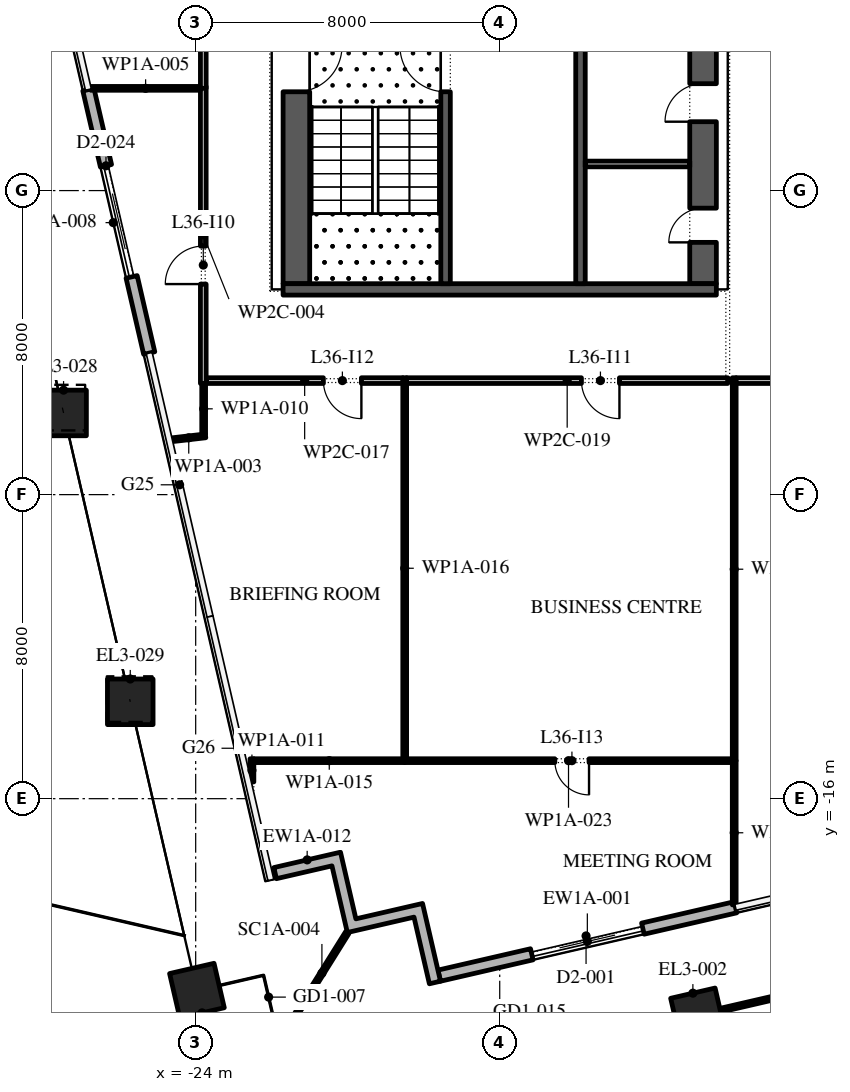
"""IFC4 building model, lengths in metres.
Left out: names, types, materials, properties, quantities, classifications, styles, units other than length and angle.
Written with IfcOpenShell. Run it as: python <this file> out.ifc"""

import sys

from ifc_helpers import new_model, si_unit, direction, frame, frame_2d, origin, origin_2d, place, context, subcontext, project, spatial, polyline, rectangle, outline, extrude, element, fill, save


model = new_model("IFC4")
c1 = context("Model", 3, precision=1e-05, world=origin(), true_north=direction((0.0, 1.0)))
c2 = subcontext(c1, "Body", "Model", "MODEL_VIEW")
j1 = project(units=[si_unit("LENGTHUNIT", "METRE"), si_unit("PLANEANGLEUNIT", "RADIAN")], contexts=[c1])
p1 = place(None, origin())
s1 = spatial("IfcSite", under=j1, at=p1, CompositionType="ELEMENT")
p2 = place(p1, origin())
s2 = spatial("IfcBuilding", under=s1, at=p2, CompositionType="ELEMENT")
p3 = place(p2, frame((0.0, 0.0, 165.6)))
s3 = spatial("IfcBuildingStorey", under=s2, at=p3, CompositionType="ELEMENT", Elevation=165.6)
p4 = place(p3, frame((-10.782, -21.702, 0.0), z_axis=(0.0, 0.0, 1.0), x_axis=(0.974370064785, 0.224951054344, 0.0)))
e1 = element("IfcColumn", 1, at=p4, inside=s3, PredefinedType="COLUMN", context=c2, shape_type="SweptSolid", body=[
    extrude(rectangle(XDim=1.2, YDim=1.2, at=origin_2d()), origin(), (0.0, 0.0, 1.0), 6.0),
])
p5 = place(p3, frame((-27.476, -5.851, 0.0), z_axis=(-0.005410224046, 0.023390066364, 0.999711775599), x_axis=(-0.974276841123, -0.225354469338, 0.0)))
e2 = element("IfcColumn", 2, at=p5, inside=s3, PredefinedType="COLUMN", context=c2, shape_type="SweptSolid", body=[
    extrude(rectangle(XDim=1.2, YDim=1.2, at=origin_2d()), origin(), (0.0, 0.0, 1.0), 6.002),
])
p6 = place(p3, frame((-25.721, -13.451, 0.0), z_axis=(-0.002726040971, 0.011677220279, 0.999928103029), x_axis=(-0.97381617579, -0.227336877275, 0.0)))
e3 = element("IfcColumn", 3, at=p6, inside=s3, PredefinedType="COLUMN", context=c2, shape_type="SweptSolid", body=[
    extrude(rectangle(XDim=1.2, YDim=1.2, at=origin_2d()), origin(), (0.0, 0.0, 1.0), 6.0),
])
p7 = place(p3, frame((-23.967, -21.051, 0.0), z_axis=(0.0, 0.0, 1.0), x_axis=(0.974370064785, 0.224951054344, 0.0)))
e4 = element("IfcColumn", 4, at=p7, inside=s3, PredefinedType="COLUMN", context=c2, shape_type="SweptSolid", body=[
    extrude(rectangle(XDim=1.2, YDim=1.2, at=origin_2d()), origin(), (0.0, 0.0, 1.0), 6.0),
])
p8 = place(p3, frame((-17.592, -20.657, 0.0), z_axis=(0.0, 0.0, 1.0), x_axis=(0.974371132389, 0.224946429994, 0.0)))
e5 = element("IfcWall", 5, at=p8, inside=s3, PredefinedType="STANDARD", context=c2, shape_type="SweptSolid", body=[
    extrude(rectangle(XDim=8.0, YDim=0.3, at=frame_2d((4.0, 0.0))), origin(), (0.0, 0.0, 1.0), 5.8),
])
p9 = place(p8, frame((2.5, 0.0, 0.0)))
e6 = element("IfcOpeningElement", 6, at=p9, cuts=e5, PredefinedType="OPENING", context=c2, shape_type="SweptSolid", body=[
    extrude(rectangle(XDim=3.0, YDim=3.5, at=frame_2d((1.5, 1.75))), frame((0.0, 0.16, 0.0), z_axis=(0.0, -1.0, 0.0), x_axis=(1.0, 0.0, 0.0)), (0.0, 0.0, 1.0), 0.32),
])
p10 = place(p3, frame((-26.823, 2.657, 0.0), z_axis=(0.0, 0.0, 1.0), x_axis=(0.22494221161, -0.974372106249, 0.0)))
e7 = element("IfcWall", 7, at=p10, inside=s3, PredefinedType="STANDARD", context=c2, shape_type="SweptSolid", body=[
    extrude(rectangle(XDim=7.115, YDim=0.3, at=frame_2d((3.557, 0.0))), origin(), (0.0, 0.0, 1.0), 5.8),
])
p11 = place(p10, frame((2.057, 0.0, 0.0)))
e8 = element("IfcOpeningElement", 8, at=p11, cuts=e7, PredefinedType="OPENING", context=c2, shape_type="SweptSolid", body=[
    extrude(rectangle(XDim=3.0, YDim=3.5, at=frame_2d((1.5, 1.75))), frame((0.0, 0.16, 0.0), z_axis=(0.0, -1.0, 0.0), x_axis=(1.0, 0.0, 0.0)), (0.0, 0.0, 1.0), 0.32),
])
p12 = place(p3, origin())
e9 = element("IfcWall", 9, at=p12, inside=s3, PredefinedType="STANDARD", context=c2, shape_type="SweptSolid", body=[
    extrude(outline(polyline([(-18.256, -19.117), (-20.01, -19.522), (-20.414, -17.768), (-21.876, -18.105), (-21.943, -17.813), (-20.19, -17.408), (-19.785, -19.162), (-18.031, -18.757), (-17.558, -20.803), (-17.851, -20.871), (-18.256, -19.117)])), origin(), (0.0, 0.0, 1.0), 5.8),
])
p13 = place(p3, frame((-20.01, -19.522, 0.0), z_axis=(0.0, 0.0, 1.0), x_axis=(-0.529920736377, -0.848047176257, 0.0)))
e10 = element("IfcWall", 10, at=p13, inside=s3, PredefinedType="STANDARD", context=c2, shape_type="SweptSolid", body=[
    extrude(rectangle(XDim=2.526, YDim=0.1, at=frame_2d((1.263, 0.0))), origin(), (0.0, 0.0, 1.0), 5.8),
])
p14 = place(p3, frame((-10.178, -21.563, 0.0), z_axis=(0.0, 0.0, 1.0), x_axis=(0.974370774795, 0.22494797893, 0.0)))
e11 = element("IfcWall", 11, at=p14, inside=s3, PredefinedType="STANDARD", context=c2, shape_type="SweptSolid", body=[
    extrude(rectangle(XDim=7.86, YDim=0.1, at=frame_2d((3.93, 0.0))), origin(), (0.0, 0.0, 1.0), 4.85),
])
p15 = place(p14, frame((2.43, 0.0, 0.0)))
e12 = element("IfcOpeningElement", 12, at=p15, cuts=e11, PredefinedType="OPENING", context=c2, shape_type="SweptSolid", body=[
    extrude(rectangle(XDim=3.0, YDim=3.5, at=frame_2d((1.5, 1.75))), frame((0.0, 0.06, 0.0), z_axis=(0.0, -1.0, 0.0), x_axis=(1.0, 0.0, 0.0)), (0.0, 0.0, 1.0), 0.12),
])
p16 = place(p3, frame((-21.35, -2.45, 0.0), z_axis=(0.0, 0.0, 1.0), x_axis=(0.0, 1.0, 0.0)))
e13 = element("IfcWall", 13, at=p16, inside=s3, PredefinedType="SHEAR", context=c2, shape_type="SweptSolid", body=[
    extrude(rectangle(XDim=27.9, YDim=0.7, at=frame_2d((13.95, 0.0))), origin(), (0.0, 0.0, 1.0), 5.8),
])
p17 = place(p16, frame((5.05, 0.0, 0.0)))
e14 = element("IfcOpeningElement", 14, at=p17, cuts=e13, PredefinedType="OPENING", context=c2, shape_type="SweptSolid", body=[
    extrude(rectangle(XDim=1.2, YDim=2.1, at=frame_2d((0.6, 1.05))), frame((0.0, 0.36, 0.0), z_axis=(0.0, -1.0, 0.0), x_axis=(1.0, 0.0, 0.0)), (0.0, 0.0, 1.0), 0.72),
])
p18 = place(p16, frame((21.65, 0.0, 0.0)))
e15 = element("IfcOpeningElement", 15, at=p18, cuts=e13, PredefinedType="OPENING", context=c2, shape_type="SweptSolid", body=[
    extrude(rectangle(XDim=1.2, YDim=2.1, at=frame_2d((0.6, 1.05))), frame((0.0, 0.36, 0.0), z_axis=(0.0, -1.0, 0.0), x_axis=(1.0, 0.0, 0.0)), (0.0, 0.0, 1.0), 0.72),
])
p19 = place(p3, frame((-10.65, -2.45, 0.0), z_axis=(0.0, 0.0, 1.0), x_axis=(0.0, 1.0, 0.0)))
e16 = element("IfcWall", 16, at=p19, inside=s3, PredefinedType="SHEAR", context=c2, shape_type="SweptSolid", body=[
    extrude(rectangle(XDim=27.9, YDim=0.7, at=frame_2d((13.95, 0.0))), origin(), (0.0, 0.0, 1.0), 5.8),
])
p20 = place(p19, frame((23.65, 0.0, 0.0)))
e17 = element("IfcOpeningElement", 17, at=p20, cuts=e16, PredefinedType="OPENING", context=c2, shape_type="SweptSolid", body=[
    extrude(rectangle(XDim=2.4, YDim=2.1, at=frame_2d((1.2, 1.05))), frame((0.0, 0.36, 0.0), z_axis=(0.0, -1.0, 0.0), x_axis=(1.0, 0.0, 0.0)), (0.0, 0.0, 1.0), 0.72),
])
p21 = place(p19, frame((1.087, 0.0, 0.0)))
e18 = element("IfcOpeningElement", 18, at=p21, cuts=e16, PredefinedType="OPENING", context=c2, shape_type="SweptSolid", body=[
    extrude(rectangle(XDim=0.9, YDim=2.1, at=frame_2d((0.45, 1.05))), frame((0.0, 0.36, 0.0), z_axis=(0.0, -1.0, 0.0), x_axis=(1.0, 0.0, 0.0)), (0.0, 0.0, 1.0), 0.72),
])
p22 = place(p19, frame((4.262, 0.0, 0.0)))
e19 = element("IfcOpeningElement", 19, at=p22, cuts=e16, PredefinedType="OPENING", context=c2, shape_type="SweptSolid", body=[
    extrude(rectangle(XDim=1.0, YDim=2.1, at=frame_2d((0.5, 1.05))), frame((0.0, 0.36, 0.0), z_axis=(0.0, -1.0, 0.0), x_axis=(1.0, 0.0, 0.0)), (0.0, 0.0, 1.0), 0.72),
])
p23 = place(p3, frame((-21.7, -2.6, 0.0), z_axis=(0.0, 0.0, 1.0), x_axis=(1.0, 0.0, 0.0)))
e20 = element("IfcWall", 20, at=p23, inside=s3, PredefinedType="SHEAR", context=c2, shape_type="SweptSolid", body=[
    extrude(rectangle(XDim=11.4, YDim=0.3, at=frame_2d((5.7, 0.0))), origin(), (0.0, 0.0, 1.0), 5.8),
])
p24 = place(p3, frame((-17.425, -2.45, 0.0), z_axis=(0.0, 0.0, 1.0), x_axis=(0.0, 1.0, 0.0)))
e21 = element("IfcWall", 21, at=p24, inside=s3, PredefinedType="SHEAR", context=c2, shape_type="SweptSolid", body=[
    extrude(rectangle(XDim=6.3, YDim=0.25, at=frame_2d((3.15, 0.0))), origin(), (0.0, 0.0, 1.0), 5.8),
])
p25 = place(p24, frame((5.05, 0.0, 0.0)))
e22 = element("IfcOpeningElement", 22, at=p25, cuts=e21, PredefinedType="OPENING", context=c2, shape_type="SweptSolid", body=[
    extrude(rectangle(XDim=1.2, YDim=2.1, at=frame_2d((0.6, 1.05))), frame((0.0, 0.135, 0.0), z_axis=(0.0, -1.0, 0.0), x_axis=(1.0, 0.0, 0.0)), (0.0, 0.0, 1.0), 0.27),
])
p26 = place(p3, frame((-13.875, -2.45, 0.0), z_axis=(0.0, 0.0, 1.0), x_axis=(0.0, 1.0, 0.0)))
e23 = element("IfcWall", 23, at=p26, inside=s3, PredefinedType="SHEAR", context=c2, shape_type="SweptSolid", body=[
    extrude(rectangle(XDim=21.3, YDim=0.25, at=frame_2d((10.65, 0.0))), origin(), (0.0, 0.0, 1.0), 5.8),
])
p27 = place(p26, frame((16.261, 0.0, 0.0)))
e24 = element("IfcOpeningElement", 24, at=p27, cuts=e23, PredefinedType="OPENING", context=c2, shape_type="SweptSolid", body=[
    extrude(rectangle(XDim=0.9, YDim=2.1, at=frame_2d((0.45, 1.05))), frame((0.0, 0.135, 0.0), z_axis=(0.0, -1.0, 0.0), x_axis=(1.0, 0.0, 0.0)), (0.0, 0.0, 1.0), 0.27),
])
p28 = place(p26, frame((19.325, 0.0, 0.0)))
e25 = element("IfcOpeningElement", 25, at=p28, cuts=e23, PredefinedType="OPENING", context=c2, shape_type="SweptSolid", body=[
    extrude(rectangle(XDim=0.9, YDim=2.1, at=frame_2d((0.45, 1.05))), frame((0.0, 0.135, 0.0), z_axis=(0.0, -1.0, 0.0), x_axis=(1.0, 0.0, 0.0)), (0.0, 0.0, 1.0), 0.27),
])
p29 = place(p26, frame((6.971, 0.0, 0.0)))
e26 = element("IfcOpeningElement", 26, at=p29, cuts=e23, PredefinedType="OPENING", context=c2, shape_type="SweptSolid", body=[
    extrude(rectangle(XDim=1.1, YDim=2.1, at=frame_2d((0.55, 1.05))), frame((0.0, 0.135, 0.0), z_axis=(0.0, -1.0, 0.0), x_axis=(1.0, 0.0, 0.0)), (0.0, 0.0, 1.0), 0.27),
])
p30 = place(p26, frame((9.114, 0.0, 0.0)))
e27 = element("IfcOpeningElement", 27, at=p30, cuts=e23, PredefinedType="OPENING", context=c2, shape_type="SweptSolid", body=[
    extrude(rectangle(XDim=1.1, YDim=2.1, at=frame_2d((0.55, 1.05))), frame((0.0, 0.135, 0.0), z_axis=(0.0, -1.0, 0.0), x_axis=(1.0, 0.0, 0.0)), (0.0, 0.0, 1.0), 0.27),
])
p31 = place(p26, frame((11.257, 0.0, 0.0)))
e28 = element("IfcOpeningElement", 28, at=p31, cuts=e23, PredefinedType="OPENING", context=c2, shape_type="SweptSolid", body=[
    extrude(rectangle(XDim=1.1, YDim=2.1, at=frame_2d((0.55, 1.05))), frame((0.0, 0.135, 0.0), z_axis=(0.0, -1.0, 0.0), x_axis=(1.0, 0.0, 0.0)), (0.0, 0.0, 1.0), 0.27),
])
p32 = place(p26, frame((13.4, 0.0, 0.0)))
e29 = element("IfcOpeningElement", 29, at=p32, cuts=e23, PredefinedType="OPENING", context=c2, shape_type="SweptSolid", body=[
    extrude(rectangle(XDim=1.1, YDim=2.1, at=frame_2d((0.55, 1.05))), frame((0.0, 0.135, 0.0), z_axis=(0.0, -1.0, 0.0), x_axis=(1.0, 0.0, 0.0)), (0.0, 0.0, 1.0), 0.27),
])
p33 = place(p3, frame((-13.75, 0.7, 0.0), z_axis=(0.0, 0.0, 1.0), x_axis=(1.0, 0.0, 0.0)))
e30 = element("IfcWall", 30, at=p33, inside=s3, PredefinedType="PARTITIONING", context=c2, shape_type="SweptSolid", body=[
    extrude(rectangle(XDim=2.75, YDim=0.15, at=frame_2d((1.375, 0.0))), origin(), (0.0, 0.0, 1.0), 5.8),
])
p34 = place(p3, frame((-24.625, -6.556, 0.0), z_axis=(0.0, 0.0, 1.0), x_axis=(0.993448484477, 0.114280832559, 0.0)))
e31 = element("IfcWall", 31, at=p34, inside=s3, PredefinedType="PARTITIONING", context=c2, shape_type="SweptSolid", body=[
    extrude(rectangle(XDim=0.891, YDim=0.1, at=frame_2d((0.445, 0.0))), origin(), (0.0, 0.0, 1.0), 5.8),
])
p35 = place(p3, frame((-23.8, -5.075, 0.0), z_axis=(0.0, 0.0, 1.0), x_axis=(0.0, 1.0, 0.0)))
e32 = element("IfcWall", 32, at=p35, inside=s3, PredefinedType="PARTITIONING", context=c2, shape_type="SweptSolid", body=[
    extrude(rectangle(XDim=7.815, YDim=0.15, at=frame_2d((3.907, 0.0))), origin(), (0.0, 0.0, 1.0), 5.8),
])
p36 = place(p35, frame((2.615, 0.0, 0.0)))
e33 = element("IfcOpeningElement", 33, at=p36, cuts=e32, PredefinedType="OPENING", context=c2, shape_type="SweptSolid", body=[
    extrude(rectangle(XDim=1.0, YDim=2.1, at=frame_2d((0.5, 1.05))), frame((0.0, 0.085, 0.0), z_axis=(0.0, -1.0, 0.0), x_axis=(1.0, 0.0, 0.0)), (0.0, 0.0, 1.0), 0.17),
])
p37 = place(p3, frame((-23.875, 2.69, 0.0), z_axis=(0.0, 0.0, 1.0), x_axis=(-1.0, 0.0, 0.0)))
e34 = element("IfcWall", 34, at=p37, inside=s3, PredefinedType="PARTITIONING", context=c2, shape_type="SweptSolid", body=[
    extrude(rectangle(XDim=2.885, YDim=0.1, at=frame_2d((1.442, 0.0))), origin(), (0.0, 0.0, 1.0), 5.8),
])
p38 = place(p3, frame((-23.8, 2.69, 0.0), z_axis=(0.0, 0.0, 1.0), x_axis=(0.0, 1.0, 0.0)))
e35 = element("IfcWall", 35, at=p38, inside=s3, PredefinedType="PARTITIONING", context=c2, shape_type="SweptSolid", body=[
    extrude(rectangle(XDim=12.64, YDim=0.15, at=frame_2d((6.32, 0.0))), origin(), (0.0, 0.0, 1.0), 5.8),
])
p39 = place(p38, frame((5.79, 0.0, 0.0)))
e36 = element("IfcOpeningElement", 36, at=p39, cuts=e35, PredefinedType="OPENING", context=c2, shape_type="SweptSolid", body=[
    extrude(rectangle(XDim=1.0, YDim=2.1, at=frame_2d((0.5, 1.05))), frame((0.0, 0.085, 0.0), z_axis=(0.0, -1.0, 0.0), x_axis=(1.0, 0.0, 0.0)), (0.0, 0.0, 1.0), 0.17),
])
p40 = place(p3, frame((-23.79, -5.075, 0.0), z_axis=(0.0, 0.0, 1.0), x_axis=(0.0, -1.0, 0.0)))
e37 = element("IfcWall", 37, at=p40, inside=s3, PredefinedType="PARTITIONING", context=c2, shape_type="SweptSolid", body=[
    extrude(rectangle(XDim=1.335, YDim=0.1, at=frame_2d((0.667, 0.0))), origin(), (0.0, 0.0, 1.0), 5.8),
])
p41 = place(p3, frame((-22.52, -14.95, 0.0), z_axis=(0.0, 0.0, 1.0), x_axis=(0.0, -1.0, 0.0)))
e38 = element("IfcWall", 38, at=p41, inside=s3, PredefinedType="PARTITIONING", context=c2, shape_type="SweptSolid", body=[
    extrude(rectangle(XDim=0.61, YDim=0.1, at=frame_2d((0.305, 0.0))), origin(), (0.0, 0.0, 1.0), 5.8),
])
p42 = place(p3, frame((-18.5, -15.0, 0.0), z_axis=(0.0, 0.0, 1.0), x_axis=(-1.0, 0.0, 0.0)))
e39 = element("IfcWall", 39, at=p42, inside=s3, PredefinedType="PARTITIONING", context=c2, shape_type="SweptSolid", body=[
    extrude(rectangle(XDim=3.97, YDim=0.1, at=frame_2d((1.985, 0.0))), origin(), (0.0, 0.0, 1.0), 5.8),
])
p43 = place(p3, frame((-18.5, -14.95, 0.0), z_axis=(0.0, 0.0, 1.0), x_axis=(0.0, 1.0, 0.0)))
e40 = element("IfcWall", 40, at=p43, inside=s3, PredefinedType="PARTITIONING", context=c2, shape_type="SweptSolid", body=[
    extrude(rectangle(XDim=10.025, YDim=0.1, at=frame_2d((5.012, 0.0))), origin(), (0.0, 0.0, 1.0), 5.8),
])
p44 = place(p3, frame((-18.55, -5.0, 0.0), z_axis=(0.0, 0.0, 1.0), x_axis=(-1.0, 0.0, 0.0)))
e41 = element("IfcWall", 41, at=p44, inside=s3, PredefinedType="PARTITIONING", context=c2, shape_type="SweptSolid", body=[
    extrude(rectangle(XDim=5.165, YDim=0.15, at=frame_2d((2.583, 0.0))), origin(), (0.0, 0.0, 1.0), 5.8),
])
p45 = place(p44, frame((1.09, 0.0, 0.0)))
e42 = element("IfcOpeningElement", 42, at=p45, cuts=e41, PredefinedType="OPENING", context=c2, shape_type="SweptSolid", body=[
    extrude(rectangle(XDim=1.0, YDim=2.1, at=frame_2d((0.5, 1.05))), frame((0.0, 0.085, 0.0), z_axis=(0.0, -1.0, 0.0), x_axis=(1.0, 0.0, 0.0)), (0.0, 0.0, 1.0), 0.17),
])
p46 = place(p3, frame((-10.0, -5.0, 0.0), z_axis=(0.0, 0.0, 1.0), x_axis=(-1.0, 0.0, 0.0)))
e43 = element("IfcWall", 43, at=p46, inside=s3, PredefinedType="PARTITIONING", context=c2, shape_type="SweptSolid", body=[
    extrude(rectangle(XDim=8.45, YDim=0.15, at=frame_2d((4.225, 0.0))), origin(), (0.0, 0.0, 1.0), 5.8),
])
p47 = place(p46, frame((2.85, 0.0, 0.0)))
e44 = element("IfcOpeningElement", 44, at=p47, cuts=e43, PredefinedType="OPENING", context=c2, shape_type="SweptSolid", body=[
    extrude(rectangle(XDim=1.0, YDim=2.1, at=frame_2d((0.5, 1.05))), frame((0.0, 0.085, 0.0), z_axis=(0.0, -1.0, 0.0), x_axis=(1.0, 0.0, 0.0)), (0.0, 0.0, 1.0), 0.17),
])
p48 = place(p3, frame((-9.83, -18.794, 0.0), z_axis=(0.0, 0.0, 1.0), x_axis=(0.0, 1.0, 0.0)))
e45 = element("IfcWall", 45, at=p48, inside=s3, PredefinedType="PARTITIONING", context=c2, shape_type="SweptSolid", body=[
    extrude(rectangle(XDim=3.794, YDim=0.1, at=frame_2d((1.897, 0.0))), origin(), (0.0, 0.0, 1.0), 5.8),
])
p49 = place(p3, frame((-9.88, -15.0, 0.0), z_axis=(0.0, 0.0, 1.0), x_axis=(-1.0, 0.0, 0.0)))
e46 = element("IfcWall", 46, at=p49, inside=s3, PredefinedType="PARTITIONING", context=c2, shape_type="SweptSolid", body=[
    extrude(rectangle(XDim=8.62, YDim=0.1, at=frame_2d((4.31, 0.0))), origin(), (0.0, 0.0, 1.0), 5.8),
])
p50 = place(p49, frame((3.77, 0.0, 0.0)))
e47 = element("IfcOpeningElement", 47, at=p50, cuts=e46, PredefinedType="OPENING", context=c2, shape_type="SweptSolid", body=[
    extrude(rectangle(XDim=0.9, YDim=2.1, at=frame_2d((0.45, 1.05))), frame((0.0, 0.06, 0.0), z_axis=(0.0, -1.0, 0.0), x_axis=(1.0, 0.0, 0.0)), (0.0, 0.0, 1.0), 0.12),
])
p51 = place(p3, frame((-9.83, -15.0, 0.0), z_axis=(0.0, 0.0, 1.0), x_axis=(0.0, 1.0, 0.0)))
e48 = element("IfcWall", 48, at=p51, inside=s3, PredefinedType="PARTITIONING", context=c2, shape_type="SweptSolid", body=[
    extrude(rectangle(XDim=10.075, YDim=0.1, at=frame_2d((5.038, 0.0))), origin(), (0.0, 0.0, 1.0), 5.8),
])
p52 = place(p3, frame((-1.065, -5.0, 0.0), z_axis=(0.0, 0.0, 1.0), x_axis=(-1.0, 0.0, 0.0)))
e49 = element("IfcWall", 49, at=p52, inside=s3, PredefinedType="PARTITIONING", context=c2, shape_type="SweptSolid", body=[
    extrude(rectangle(XDim=8.715, YDim=0.15, at=frame_2d((4.357, 0.0))), origin(), (0.0, 0.0, 1.0), 5.8),
])
p53 = place(p9, origin())
e50 = element("IfcDoor", 50, at=p53, inside=s3, OperationType="DOUBLE_DOOR_SLIDING", PredefinedType="DOOR", context=c2, shape_type="SweptSolid", body=[
    extrude(rectangle(XDim=3.0, YDim=3.5, at=frame_2d((1.5, 1.75))), frame((0.0, 0.025, 0.0), z_axis=(0.0, -1.0, 0.0), x_axis=(1.0, 0.0, 0.0)), (0.0, 0.0, 1.0), 0.05),
])
fill(e6, e50)
p54 = place(p11, origin())
e51 = element("IfcDoor", 51, at=p54, inside=s3, OperationType="DOUBLE_DOOR_SLIDING", PredefinedType="DOOR", context=c2, shape_type="SweptSolid", body=[
    extrude(rectangle(XDim=3.0, YDim=3.5, at=frame_2d((1.5, 1.75))), frame((0.0, 0.025, 0.0), z_axis=(0.0, -1.0, 0.0), x_axis=(1.0, 0.0, 0.0)), (0.0, 0.0, 1.0), 0.05),
])
fill(e8, e51)
p55 = place(p25, origin())
e52 = element("IfcDoor", 52, at=p55, inside=s3, OperationType="SINGLE_SWING_LEFT", PredefinedType="DOOR", context=c2, shape_type="SweptSolid", body=[
    extrude(rectangle(XDim=1.2, YDim=2.1, at=frame_2d((0.6, 1.05))), frame((0.0, 0.025, 0.0), z_axis=(0.0, -1.0, 0.0), x_axis=(1.0, 0.0, 0.0)), (0.0, 0.0, 1.0), 0.05),
])
fill(e22, e52)
p56 = place(p17, frame((1.2, 0.0, 0.0), z_axis=(0.0, 0.0, 1.0), x_axis=(-1.0, 0.0, 0.0)))
e53 = element("IfcDoor", 53, at=p56, inside=s3, OperationType="SINGLE_SWING_RIGHT", PredefinedType="DOOR", context=c2, shape_type="SweptSolid", body=[
    extrude(rectangle(XDim=1.2, YDim=2.1, at=frame_2d((0.6, 1.05))), frame((0.0, 0.025, 0.0), z_axis=(0.0, -1.0, 0.0), x_axis=(1.0, 0.0, 0.0)), (0.0, 0.0, 1.0), 0.05),
])
fill(e14, e53)
p57 = place(p21, origin())
e54 = element("IfcDoor", 54, at=p57, inside=s3, OperationType="SINGLE_SWING_RIGHT", PredefinedType="DOOR", context=c2, shape_type="SweptSolid", body=[
    extrude(rectangle(XDim=0.9, YDim=2.1, at=frame_2d((0.45, 1.05))), frame((0.0, 0.35, 0.0), z_axis=(0.0, -1.0, 0.0), x_axis=(1.0, 0.0, 0.0)), (0.0, 0.0, 1.0), 0.05),
])
fill(e18, e54)
p58 = place(p22, origin())
e55 = element("IfcDoor", 55, at=p58, inside=s3, OperationType="SINGLE_SWING_RIGHT", PredefinedType="DOOR", context=c2, shape_type="SweptSolid", body=[
    extrude(rectangle(XDim=1.0, YDim=2.1, at=frame_2d((0.5, 1.05))), frame((0.0, 0.35, 0.0), z_axis=(0.0, -1.0, 0.0), x_axis=(1.0, 0.0, 0.0)), (0.0, 0.0, 1.0), 0.05),
])
fill(e19, e55)
p59 = place(p36, origin())
e56 = element("IfcDoor", 56, at=p59, inside=s3, OperationType="SINGLE_SWING_RIGHT", PredefinedType="DOOR", context=c2, shape_type="SweptSolid", body=[
    extrude(rectangle(XDim=1.0, YDim=2.1, at=frame_2d((0.5, 1.05))), frame((0.0, 0.025, 0.0), z_axis=(0.0, -1.0, 0.0), x_axis=(1.0, 0.0, 0.0)), (0.0, 0.0, 1.0), 0.05),
])
fill(e33, e56)
p60 = place(p47, origin())
e57 = element("IfcDoor", 57, at=p60, inside=s3, OperationType="SINGLE_SWING_RIGHT", PredefinedType="DOOR", context=c2, shape_type="SweptSolid", body=[
    extrude(rectangle(XDim=1.0, YDim=2.1, at=frame_2d((0.5, 1.05))), frame((0.0, 0.025, 0.0), z_axis=(0.0, -1.0, 0.0), x_axis=(1.0, 0.0, 0.0)), (0.0, 0.0, 1.0), 0.05),
])
fill(e44, e57)
p61 = place(p45, origin())
e58 = element("IfcDoor", 58, at=p61, inside=s3, OperationType="SINGLE_SWING_RIGHT", PredefinedType="DOOR", context=c2, shape_type="SweptSolid", body=[
    extrude(rectangle(XDim=1.0, YDim=2.1, at=frame_2d((0.5, 1.05))), frame((0.0, 0.025, 0.0), z_axis=(0.0, -1.0, 0.0), x_axis=(1.0, 0.0, 0.0)), (0.0, 0.0, 1.0), 0.05),
])
fill(e42, e58)
p62 = place(p50, origin())
e59 = element("IfcDoor", 59, at=p62, inside=s3, OperationType="SINGLE_SWING_RIGHT", PredefinedType="DOOR", context=c2, shape_type="SweptSolid", body=[
    extrude(rectangle(XDim=0.9, YDim=2.1, at=frame_2d((0.45, 1.05))), frame((0.0, 0.025, 0.0), z_axis=(0.0, -1.0, 0.0), x_axis=(1.0, 0.0, 0.0)), (0.0, 0.0, 1.0), 0.05),
])
fill(e47, e59)
save(model, sys.argv[1])
